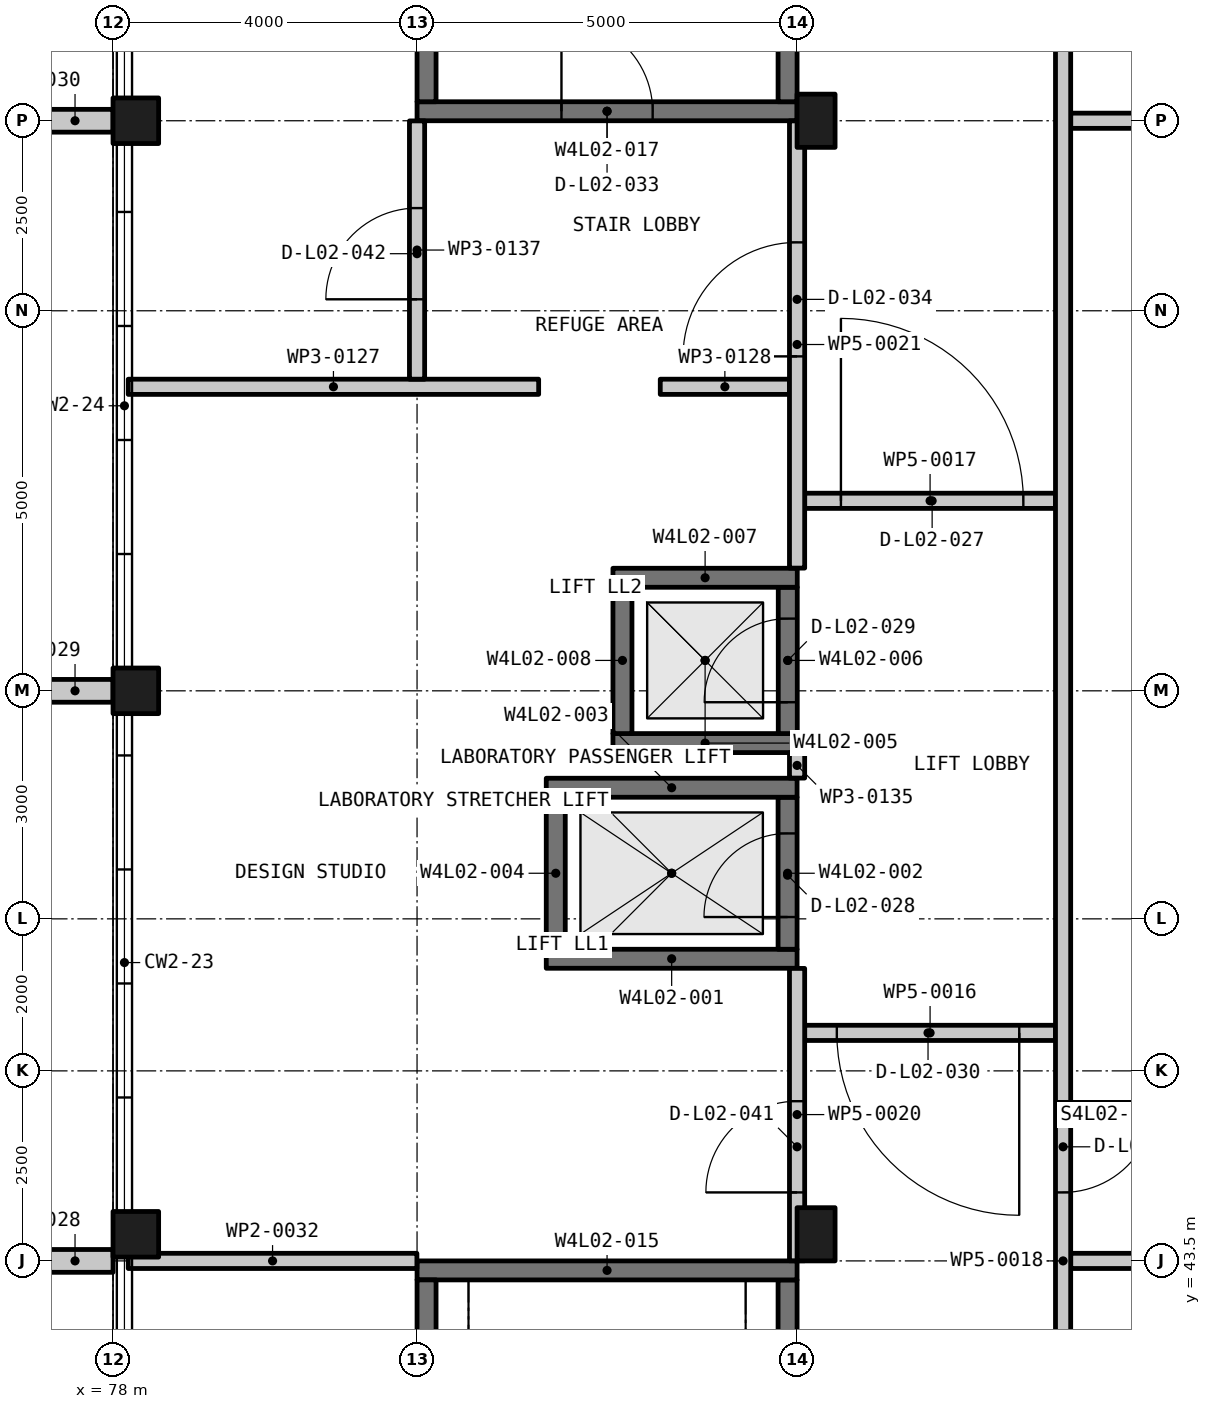
"""IFC4 building model, lengths in metres.
Left out: names, types, materials, properties, quantities, classifications, styles, units other than length and angle.
Written with IfcOpenShell. Run it as: python <this file> out.ifc"""

import sys

from ifc_helpers import new_model, si_unit, direction, frame, frame_2d, origin, origin_2d, place, context, subcontext, project, spatial, rectangle, extrude, element, fill, save


model = new_model("IFC4")
c1 = context("Model", 3, precision=1e-05, world=origin(), true_north=direction((0.0, 1.0)))
c2 = subcontext(c1, "Body", "Model", "MODEL_VIEW")
j1 = project(units=[si_unit("LENGTHUNIT", "METRE"), si_unit("PLANEANGLEUNIT", "RADIAN")], contexts=[c1])
p1 = place(None, origin())
s1 = spatial("IfcSite", under=j1, at=p1, CompositionType="ELEMENT")
p2 = place(p1, origin())
s2 = spatial("IfcBuilding", under=s1, at=p2, CompositionType="ELEMENT")
p3 = place(p2, frame((0.0, 0.0, 11.25)))
s3 = spatial("IfcBuildingStorey", under=s2, at=p3, CompositionType="ELEMENT", Elevation=11.25)
for number, where, z_axis, x_axis in (
    (1, (78.3, 43.85, -0.3), (0.0, 0.0, 1.0), (1.0, 0.0, 0.0)),
    (2, (78.3, 51.0, -0.3), (0.0, 0.0, 1.0), (1.0, 0.0, 0.0)),
    (3, (78.3, 58.5, -0.3), (0.0, 0.0, 1.0), (1.0, 0.0, 0.0)),
):
    element("IfcColumn", number, at=place(p3, frame(where, z_axis=z_axis, x_axis=x_axis)), inside=s3, PredefinedType="COLUMN", context=c2, shape_type="SweptSolid", body=[
        extrude(rectangle(XDim=0.6, YDim=0.6, at=origin_2d()), origin(), (0.0, 0.0, 1.0), 4.5),
    ])
for number, where, z_axis, x_axis in (
    (4, (87.25, 43.85, -0.3), (0.0, 0.0, 1.0), (1.0, 0.0, 0.0)),
    (5, (87.25, 58.5, -0.3), (0.0, 0.0, 1.0), (1.0, 0.0, 0.0)),
):
    element("IfcColumn", number, at=place(p3, frame(where, z_axis=z_axis, x_axis=x_axis)), inside=s3, PredefinedType="COLUMN", context=c2, shape_type="SweptSolid", body=[
        extrude(rectangle(XDim=0.5, YDim=0.7, at=origin_2d()), origin(), (0.0, 0.0, 1.0), 4.5),
    ])
p4 = place(p3, frame((83.7, 47.475, -0.3), z_axis=(0.0, 0.0, 1.0), x_axis=(1.0, 0.0, 0.0)))
e6 = element("IfcWall", 6, at=p4, inside=s3, PredefinedType="SHEAR", context=c2, shape_type="SweptSolid", body=[
    extrude(rectangle(XDim=3.3, YDim=0.25, at=frame_2d((1.65, 0.0))), origin(), (0.0, 0.0, 1.0), 4.5),
])
p5 = place(p3, frame((86.875, 47.6, -0.3), z_axis=(0.0, 0.0, 1.0), x_axis=(0.0, 1.0, 0.0)))
e7 = element("IfcWall", 7, at=p5, inside=s3, PredefinedType="SHEAR", context=c2, shape_type="SweptSolid", body=[
    extrude(rectangle(XDim=2.0, YDim=0.25, at=frame_2d((1.0, 0.0))), origin(), (0.0, 0.0, 1.0), 4.5),
])
p6 = place(p5, frame((0.424, 0.0, 0.3)))
e8 = element("IfcOpeningElement", 8, at=p6, cuts=e7, PredefinedType="OPENING", context=c2, shape_type="SweptSolid", body=[
    extrude(rectangle(XDim=1.1, YDim=2.1, at=frame_2d((0.55, 1.05))), frame((0.0, 0.135, 0.0), z_axis=(0.0, -1.0, 0.0), x_axis=(1.0, 0.0, 0.0)), (0.0, 0.0, 1.0), 0.27),
])
p7 = place(p3, frame((83.7, 49.725, -0.3), z_axis=(0.0, 0.0, 1.0), x_axis=(1.0, 0.0, 0.0)))
e9 = element("IfcWall", 9, at=p7, inside=s3, PredefinedType="SHEAR", context=c2, shape_type="SweptSolid", body=[
    extrude(rectangle(XDim=3.3, YDim=0.25, at=frame_2d((1.65, 0.0))), origin(), (0.0, 0.0, 1.0), 4.5),
])
p8 = place(p3, frame((83.825, 47.6, -0.3), z_axis=(0.0, 0.0, 1.0), x_axis=(0.0, 1.0, 0.0)))
e10 = element("IfcWall", 10, at=p8, inside=s3, PredefinedType="SHEAR", context=c2, shape_type="SweptSolid", body=[
    extrude(rectangle(XDim=2.0, YDim=0.25, at=frame_2d((1.0, 0.0))), origin(), (0.0, 0.0, 1.0), 4.5),
])
p9 = place(p3, frame((84.577, 50.312, -0.3), z_axis=(0.0, 0.0, 1.0), x_axis=(1.0, 0.0, 0.0)))
e11 = element("IfcWall", 11, at=p9, inside=s3, PredefinedType="SHEAR", context=c2, shape_type="SweptSolid", body=[
    extrude(rectangle(XDim=2.425, YDim=0.25, at=frame_2d((1.212, 0.0))), origin(), (0.0, 0.0, 1.0), 4.5),
])
p10 = place(p3, frame((86.877, 50.438, -0.3), z_axis=(0.0, 0.0, 1.0), x_axis=(0.0, 1.0, 0.0)))
e12 = element("IfcWall", 12, at=p10, inside=s3, PredefinedType="SHEAR", context=c2, shape_type="SweptSolid", body=[
    extrude(rectangle(XDim=1.925, YDim=0.25, at=frame_2d((0.962, 0.0))), origin(), (0.0, 0.0, 1.0), 4.5),
])
p11 = place(p10, frame((0.413, 0.0, 0.3)))
e13 = element("IfcOpeningElement", 13, at=p11, cuts=e12, PredefinedType="OPENING", context=c2, shape_type="SweptSolid", body=[
    extrude(rectangle(XDim=1.1, YDim=2.1, at=frame_2d((0.55, 1.05))), frame((0.0, 0.135, 0.0), z_axis=(0.0, -1.0, 0.0), x_axis=(1.0, 0.0, 0.0)), (0.0, 0.0, 1.0), 0.27),
])
p12 = place(p3, frame((84.577, 52.488, -0.3), z_axis=(0.0, 0.0, 1.0), x_axis=(1.0, 0.0, 0.0)))
e14 = element("IfcWall", 14, at=p12, inside=s3, PredefinedType="SHEAR", context=c2, shape_type="SweptSolid", body=[
    extrude(rectangle(XDim=2.425, YDim=0.25, at=frame_2d((1.212, 0.0))), origin(), (0.0, 0.0, 1.0), 4.5),
])
p13 = place(p3, frame((84.702, 50.438, -0.3), z_axis=(0.0, 0.0, 1.0), x_axis=(0.0, 1.0, 0.0)))
e15 = element("IfcWall", 15, at=p13, inside=s3, PredefinedType="SHEAR", context=c2, shape_type="SweptSolid", body=[
    extrude(rectangle(XDim=1.925, YDim=0.25, at=frame_2d((0.962, 0.0))), origin(), (0.0, 0.0, 1.0), 4.5),
])
p14 = place(p3, frame((86.875, 36.25, -0.3), z_axis=(0.0, 0.0, 1.0), x_axis=(0.0, 1.0, 0.0)))
e16 = element("IfcWall", 16, at=p14, inside=s3, PredefinedType="SHEAR", context=c2, shape_type="SweptSolid", body=[
    extrude(rectangle(XDim=7.0, YDim=0.25, at=frame_2d((3.5, 0.0))), origin(), (0.0, 0.0, 1.0), 4.5),
])
p15 = place(p3, frame((82.0, 43.375, -0.3), z_axis=(0.0, 0.0, 1.0), x_axis=(1.0, 0.0, 0.0)))
e17 = element("IfcWall", 17, at=p15, inside=s3, PredefinedType="SHEAR", context=c2, shape_type="SweptSolid", body=[
    extrude(rectangle(XDim=5.0, YDim=0.25, at=frame_2d((2.5, 0.0))), origin(), (0.0, 0.0, 1.0), 4.5),
])
p16 = place(p3, frame((82.125, 36.25, -0.3), z_axis=(0.0, 0.0, 1.0), x_axis=(0.0, 1.0, 0.0)))
e18 = element("IfcWall", 18, at=p16, inside=s3, PredefinedType="SHEAR", context=c2, shape_type="SweptSolid", body=[
    extrude(rectangle(XDim=7.0, YDim=0.25, at=frame_2d((3.5, 0.0))), origin(), (0.0, 0.0, 1.0), 4.5),
])
p17 = place(p3, frame((82.0, 58.625, -0.3), z_axis=(0.0, 0.0, 1.0), x_axis=(1.0, 0.0, 0.0)))
e19 = element("IfcWall", 19, at=p17, inside=s3, PredefinedType="SHEAR", context=c2, shape_type="SweptSolid", body=[
    extrude(rectangle(XDim=5.0, YDim=0.25, at=frame_2d((2.5, 0.0))), origin(), (0.0, 0.0, 1.0), 4.5),
])
p18 = place(p17, frame((1.9, 0.0, 0.3)))
e20 = element("IfcOpeningElement", 20, at=p18, cuts=e19, PredefinedType="OPENING", context=c2, shape_type="SweptSolid", body=[
    extrude(rectangle(XDim=1.2, YDim=2.2, at=frame_2d((0.6, 1.1))), frame((0.0, 0.135, 0.0), z_axis=(0.0, -1.0, 0.0), x_axis=(1.0, 0.0, 0.0)), (0.0, 0.0, 1.0), 0.27),
])
for number, where, z_axis, x_axis in (
    (21, (86.875, 58.75, -0.3), (0.0, 0.0, 1.0), (0.0, 1.0, 0.0)),
    (22, (82.125, 58.75, -0.3), (0.0, 0.0, 1.0), (0.0, 1.0, 0.0)),
):
    element("IfcWall", number, at=place(p3, frame(where, z_axis=z_axis, x_axis=x_axis)), inside=s3, PredefinedType="SHEAR", context=c2, shape_type="SweptSolid", body=[
        extrude(rectangle(XDim=7.0, YDim=0.25, at=frame_2d((3.5, 0.0))), origin(), (0.0, 0.0, 1.0), 4.5),
    ])
for number, where, z_axis, x_axis in (
    (23, (77.0, 43.5, 0.0), (0.0, 0.0, 1.0), (1.0, 0.0, 0.0)),
    (24, (77.0, 51.0, 0.0), (0.0, 0.0, 1.0), (1.0, 0.0, 0.0)),
    (25, (77.0, 58.5, 0.0), (0.0, 0.0, 1.0), (1.0, 0.0, 0.0)),
):
    element("IfcWall", number, at=place(p3, frame(where, z_axis=z_axis, x_axis=x_axis)), inside=s3, PredefinedType="SOLIDWALL", context=c2, shape_type="SweptSolid", body=[
        extrude(rectangle(XDim=1.0, YDim=0.3, at=frame_2d((0.5, 0.0))), origin(), (0.0, 0.0, 1.0), 4.5),
    ])
p19 = place(p3, frame((78.2, 43.5, 0.0), z_axis=(0.0, 0.0, 1.0), x_axis=(1.0, 0.0, 0.0)))
e26 = element("IfcWall", 26, at=p19, inside=s3, PredefinedType="PARTITIONING", context=c2, shape_type="SweptSolid", body=[
    extrude(rectangle(XDim=3.798, YDim=0.2, at=frame_2d((1.899, 0.0))), origin(), (0.0, 0.0, 1.0), 3.4),
])
p20 = place(p3, frame((90.6, 43.5, 0.0), z_axis=(0.0, 0.0, 1.0), x_axis=(1.0, 0.0, 0.0)))
e27 = element("IfcWall", 27, at=p20, inside=s3, PredefinedType="PARTITIONING", context=c2, shape_type="SweptSolid", body=[
    extrude(rectangle(XDim=12.998, YDim=0.2, at=frame_2d((6.499, 0.0))), origin(), (0.0, 0.0, 1.0), 3.4),
])
p21 = place(p3, frame((90.4, 46.5, 0.0), z_axis=(0.0, 0.0, 1.0), x_axis=(-1.0, 0.0, 0.0)))
e28 = element("IfcWall", 28, at=p21, inside=s3, PredefinedType="PARTITIONING", context=c2, shape_type="SweptSolid", body=[
    extrude(rectangle(XDim=3.3, YDim=0.2, at=frame_2d((1.65, 0.0))), origin(), (0.0, 0.0, 1.0), 3.4),
])
p22 = place(p21, frame((0.477, 0.0, 0.0)))
e29 = element("IfcOpeningElement", 29, at=p22, cuts=e28, PredefinedType="OPENING", context=c2, shape_type="SweptSolid", body=[
    extrude(rectangle(XDim=2.4, YDim=2.1, at=frame_2d((1.2, 1.05))), frame((0.0, 0.11, 0.0), z_axis=(0.0, -1.0, 0.0), x_axis=(1.0, 0.0, 0.0)), (0.0, 0.0, 1.0), 0.22),
])
p23 = place(p3, frame((87.1, 53.5, 0.0), z_axis=(0.0, 0.0, 1.0), x_axis=(1.0, 0.0, 0.0)))
e30 = element("IfcWall", 30, at=p23, inside=s3, PredefinedType="PARTITIONING", context=c2, shape_type="SweptSolid", body=[
    extrude(rectangle(XDim=3.3, YDim=0.2, at=frame_2d((1.65, 0.0))), origin(), (0.0, 0.0, 1.0), 3.4),
])
p24 = place(p23, frame((0.477, 0.0, 0.0)))
e31 = element("IfcOpeningElement", 31, at=p24, cuts=e30, PredefinedType="OPENING", context=c2, shape_type="SweptSolid", body=[
    extrude(rectangle(XDim=2.4, YDim=2.1, at=frame_2d((1.2, 1.05))), frame((0.0, 0.11, 0.0), z_axis=(0.0, -1.0, 0.0), x_axis=(1.0, 0.0, 0.0)), (0.0, 0.0, 1.0), 0.22),
])
p25 = place(p3, frame((78.2, 55.0, 0.0), z_axis=(0.0, 0.0, 1.0), x_axis=(1.0, 0.0, 0.0)))
e32 = element("IfcWall", 32, at=p25, inside=s3, PredefinedType="PARTITIONING", context=c2, shape_type="SweptSolid", body=[
    extrude(rectangle(XDim=5.4, YDim=0.2, at=frame_2d((2.7, 0.0))), origin(), (0.0, 0.0, 1.0), 3.4),
])
p26 = place(p3, frame((85.2, 55.0, 0.0), z_axis=(0.0, 0.0, 1.0), x_axis=(1.0, 0.0, 0.0)))
e33 = element("IfcWall", 33, at=p26, inside=s3, PredefinedType="PARTITIONING", context=c2, shape_type="SweptSolid", body=[
    extrude(rectangle(XDim=1.7, YDim=0.2, at=frame_2d((0.85, 0.0))), origin(), (0.0, 0.0, 1.0), 3.6),
])
p27 = place(p3, frame((90.6, 58.5, 0.0), z_axis=(0.0, 0.0, 1.0), x_axis=(1.0, 0.0, 0.0)))
e34 = element("IfcWall", 34, at=p27, inside=s3, PredefinedType="PARTITIONING", context=c2, shape_type="SweptSolid", body=[
    extrude(rectangle(XDim=13.2, YDim=0.2, at=frame_2d((6.6, 0.0))), origin(), (0.0, 0.0, 1.0), 3.3),
])
p28 = place(p3, frame((90.5, 80.8, 0.0), z_axis=(0.0, 0.0, 1.0), x_axis=(0.0, -1.0, 0.0)))
e35 = element("IfcWall", 35, at=p28, inside=s3, PredefinedType="PARTITIONING", context=c2, shape_type="SweptSolid", body=[
    extrude(rectangle(XDim=74.6, YDim=0.2, at=frame_2d((37.3, 0.0))), origin(), (0.0, 0.0, 1.0), 3.3),
])
p29 = place(p28, frame((66.6, 0.0, 0.0)))
e36 = element("IfcOpeningElement", 36, at=p29, cuts=e35, PredefinedType="OPENING", context=c2, shape_type="SweptSolid", body=[
    extrude(rectangle(XDim=1.2, YDim=2.1, at=frame_2d((0.6, 1.05))), frame((0.0, 0.11, 0.0), z_axis=(0.0, -1.0, 0.0), x_axis=(1.0, 0.0, 0.0)), (0.0, 0.0, 1.0), 0.22),
])
p30 = place(p28, frame((55.45, 0.0, 0.0)))
e37 = element("IfcOpeningElement", 37, at=p30, cuts=e35, PredefinedType="OPENING", context=c2, shape_type="SweptSolid", body=[
    extrude(rectangle(XDim=1.2, YDim=2.1, at=frame_2d((0.6, 1.05))), frame((0.0, 0.11, 0.0), z_axis=(0.0, -1.0, 0.0), x_axis=(1.0, 0.0, 0.0)), (0.0, 0.0, 1.0), 0.22),
])
p31 = place(p28, frame((44.2, 0.0, 0.0)))
e38 = element("IfcOpeningElement", 38, at=p31, cuts=e35, PredefinedType="OPENING", context=c2, shape_type="SweptSolid", body=[
    extrude(rectangle(XDim=1.2, YDim=2.1, at=frame_2d((0.6, 1.05))), frame((0.0, 0.11, 0.0), z_axis=(0.0, -1.0, 0.0), x_axis=(1.0, 0.0, 0.0)), (0.0, 0.0, 1.0), 0.22),
])
p32 = place(p28, frame((35.199, 0.0, 0.0)))
e39 = element("IfcOpeningElement", 39, at=p32, cuts=e35, PredefinedType="OPENING", context=c2, shape_type="SweptSolid", body=[
    extrude(rectangle(XDim=1.2, YDim=2.1, at=frame_2d((0.6, 1.05))), frame((0.0, 0.11, 0.0), z_axis=(0.0, -1.0, 0.0), x_axis=(1.0, 0.0, 0.0)), (0.0, 0.0, 1.0), 0.22),
])
p33 = place(p28, frame((14.2, 0.0, 0.0)))
e40 = element("IfcOpeningElement", 40, at=p33, cuts=e35, PredefinedType="OPENING", context=c2, shape_type="SweptSolid", body=[
    extrude(rectangle(XDim=1.2, YDim=2.1, at=frame_2d((0.6, 1.05))), frame((0.0, 0.11, 0.0), z_axis=(0.0, -1.0, 0.0), x_axis=(1.0, 0.0, 0.0)), (0.0, 0.0, 1.0), 0.22),
])
p34 = place(p28, frame((3.075, 0.0, 0.0)))
e41 = element("IfcOpeningElement", 41, at=p34, cuts=e35, PredefinedType="OPENING", context=c2, shape_type="SweptSolid", body=[
    extrude(rectangle(XDim=1.2, YDim=2.1, at=frame_2d((0.6, 1.05))), frame((0.0, 0.11, 0.0), z_axis=(0.0, -1.0, 0.0), x_axis=(1.0, 0.0, 0.0)), (0.0, 0.0, 1.0), 0.22),
])
p35 = place(p3, frame((87.0, 43.502, 0.0), z_axis=(0.0, 0.0, 1.0), x_axis=(0.0, 1.0, 0.0)))
e42 = element("IfcWall", 42, at=p35, inside=s3, PredefinedType="PARTITIONING", context=c2, shape_type="SweptSolid", body=[
    extrude(rectangle(XDim=3.846, YDim=0.2, at=frame_2d((1.923, 0.0))), origin(), (0.0, 0.0, 1.0), 3.4),
])
p36 = place(p35, frame((0.899, 0.0, 0.0)))
e43 = element("IfcOpeningElement", 43, at=p36, cuts=e42, PredefinedType="OPENING", context=c2, shape_type="SweptSolid", body=[
    extrude(rectangle(XDim=1.2, YDim=2.1, at=frame_2d((0.6, 1.05))), frame((0.0, 0.11, 0.0), z_axis=(0.0, -1.0, 0.0), x_axis=(1.0, 0.0, 0.0)), (0.0, 0.0, 1.0), 0.22),
])
p37 = place(p3, frame((87.0, 49.852, 0.0), z_axis=(0.0, 0.0, 1.0), x_axis=(0.0, 1.0, 0.0)))
e44 = element("IfcWall", 44, at=p37, inside=s3, PredefinedType="PARTITIONING", context=c2, shape_type="SweptSolid", body=[
    extrude(rectangle(XDim=0.333, YDim=0.2, at=frame_2d((0.167, 0.0))), origin(), (0.0, 0.0, 1.0), 3.4),
])
p38 = place(p3, frame((87.0, 52.615, 0.0), z_axis=(0.0, 0.0, 1.0), x_axis=(0.0, 1.0, 0.0)))
e45 = element("IfcWall", 45, at=p38, inside=s3, PredefinedType="PARTITIONING", context=c2, shape_type="SweptSolid", body=[
    extrude(rectangle(XDim=5.884, YDim=0.2, at=frame_2d((2.942, 0.0))), origin(), (0.0, 0.0, 1.0), 3.4),
])
p39 = place(p38, frame((2.785, 0.0, 0.0)))
e46 = element("IfcOpeningElement", 46, at=p39, cuts=e45, PredefinedType="OPENING", context=c2, shape_type="SweptSolid", body=[
    extrude(rectangle(XDim=1.5, YDim=2.1, at=frame_2d((0.75, 1.05))), frame((0.0, 0.11, 0.0), z_axis=(0.0, -1.0, 0.0), x_axis=(1.0, 0.0, 0.0)), (0.0, 0.0, 1.0), 0.22),
])
p40 = place(p3, frame((82.0, 55.1, 0.0), z_axis=(0.0, 0.0, 1.0), x_axis=(0.0, 1.0, 0.0)))
e47 = element("IfcWall", 47, at=p40, inside=s3, PredefinedType="PARTITIONING", context=c2, shape_type="SweptSolid", body=[
    extrude(rectangle(XDim=3.398, YDim=0.2, at=frame_2d((1.699, 0.0))), origin(), (0.0, 0.0, 1.0), 3.4),
])
p41 = place(p40, frame((1.051, 0.0, 0.0)))
e48 = element("IfcOpeningElement", 48, at=p41, cuts=e47, PredefinedType="OPENING", context=c2, shape_type="SweptSolid", body=[
    extrude(rectangle(XDim=1.2, YDim=2.1, at=frame_2d((0.6, 1.05))), frame((0.0, 0.11, 0.0), z_axis=(0.0, -1.0, 0.0), x_axis=(1.0, 0.0, 0.0)), (0.0, 0.0, 1.0), 0.22),
])
p42 = place(p24, origin())
e49 = element("IfcDoor", 49, at=p42, inside=s3, OperationType="DOUBLE_DOOR_SINGLE_SWING", PredefinedType="DOOR", context=c2, shape_type="SweptSolid", body=[
    extrude(rectangle(XDim=2.4, YDim=2.1, at=frame_2d((1.2, 1.05))), frame((0.0, 0.025, 0.0), z_axis=(0.0, -1.0, 0.0), x_axis=(1.0, 0.0, 0.0)), (0.0, 0.0, 1.0), 0.05),
])
fill(e31, e49)
p43 = place(p6, origin())
e50 = element("IfcDoor", 50, at=p43, inside=s3, OperationType="DOUBLE_DOOR_SLIDING", PredefinedType="DOOR", context=c2, shape_type="SweptSolid", body=[
    extrude(rectangle(XDim=1.1, YDim=2.1, at=frame_2d((0.55, 1.05))), frame((0.0, 0.025, 0.0), z_axis=(0.0, -1.0, 0.0), x_axis=(1.0, 0.0, 0.0)), (0.0, 0.0, 1.0), 0.05),
])
fill(e8, e50)
p44 = place(p11, origin())
e51 = element("IfcDoor", 51, at=p44, inside=s3, OperationType="DOUBLE_DOOR_SLIDING", PredefinedType="DOOR", context=c2, shape_type="SweptSolid", body=[
    extrude(rectangle(XDim=1.1, YDim=2.1, at=frame_2d((0.55, 1.05))), frame((0.0, 0.025, 0.0), z_axis=(0.0, -1.0, 0.0), x_axis=(1.0, 0.0, 0.0)), (0.0, 0.0, 1.0), 0.05),
])
fill(e13, e51)
p45 = place(p22, origin())
e52 = element("IfcDoor", 52, at=p45, inside=s3, OperationType="DOUBLE_DOOR_SINGLE_SWING", PredefinedType="DOOR", context=c2, shape_type="SweptSolid", body=[
    extrude(rectangle(XDim=2.4, YDim=2.1, at=frame_2d((1.2, 1.05))), frame((0.0, 0.025, 0.0), z_axis=(0.0, -1.0, 0.0), x_axis=(1.0, 0.0, 0.0)), (0.0, 0.0, 1.0), 0.05),
])
fill(e29, e52)
p46 = place(p18, origin())
e53 = element("IfcDoor", 53, at=p46, inside=s3, OperationType="SINGLE_SWING_LEFT", PredefinedType="DOOR", context=c2, shape_type="SweptSolid", body=[
    extrude(rectangle(XDim=1.2, YDim=2.2, at=frame_2d((0.6, 1.1))), frame((0.0, 0.025, 0.0), z_axis=(0.0, -1.0, 0.0), x_axis=(1.0, 0.0, 0.0)), (0.0, 0.0, 1.0), 0.05),
])
fill(e20, e53)
p47 = place(p39, origin())
e54 = element("IfcDoor", 54, at=p47, inside=s3, OperationType="DOUBLE_DOOR_SINGLE_SWING", PredefinedType="DOOR", context=c2, shape_type="SweptSolid", body=[
    extrude(rectangle(XDim=1.5, YDim=2.1, at=frame_2d((0.75, 1.05))), frame((0.0, 0.025, 0.0), z_axis=(0.0, -1.0, 0.0), x_axis=(1.0, 0.0, 0.0)), (0.0, 0.0, 1.0), 0.05),
])
fill(e46, e54)
p48 = place(p36, origin())
e55 = element("IfcDoor", 55, at=p48, inside=s3, OperationType="SINGLE_SWING_RIGHT", PredefinedType="DOOR", context=c2, shape_type="SweptSolid", body=[
    extrude(rectangle(XDim=1.2, YDim=2.1, at=frame_2d((0.6, 1.05))), frame((0.0, 0.025, 0.0), z_axis=(0.0, -1.0, 0.0), x_axis=(1.0, 0.0, 0.0)), (0.0, 0.0, 1.0), 0.05),
])
fill(e43, e55)
p49 = place(p41, origin())
e56 = element("IfcDoor", 56, at=p49, inside=s3, OperationType="SINGLE_SWING_RIGHT", PredefinedType="DOOR", context=c2, shape_type="SweptSolid", body=[
    extrude(rectangle(XDim=1.2, YDim=2.1, at=frame_2d((0.6, 1.05))), frame((0.0, 0.025, 0.0), z_axis=(0.0, -1.0, 0.0), x_axis=(1.0, 0.0, 0.0)), (0.0, 0.0, 1.0), 0.05),
])
fill(e48, e56)
p50 = place(p32, origin())
e57 = element("IfcDoor", 57, at=p50, inside=s3, OperationType="SINGLE_SWING_RIGHT", PredefinedType="DOOR", context=c2, shape_type="SweptSolid", body=[
    extrude(rectangle(XDim=1.2, YDim=2.1, at=frame_2d((0.6, 1.05))), frame((0.0, 0.025, 0.0), z_axis=(0.0, -1.0, 0.0), x_axis=(1.0, 0.0, 0.0)), (0.0, 0.0, 1.0), 0.05),
])
fill(e39, e57)
save(model, sys.argv[1])
